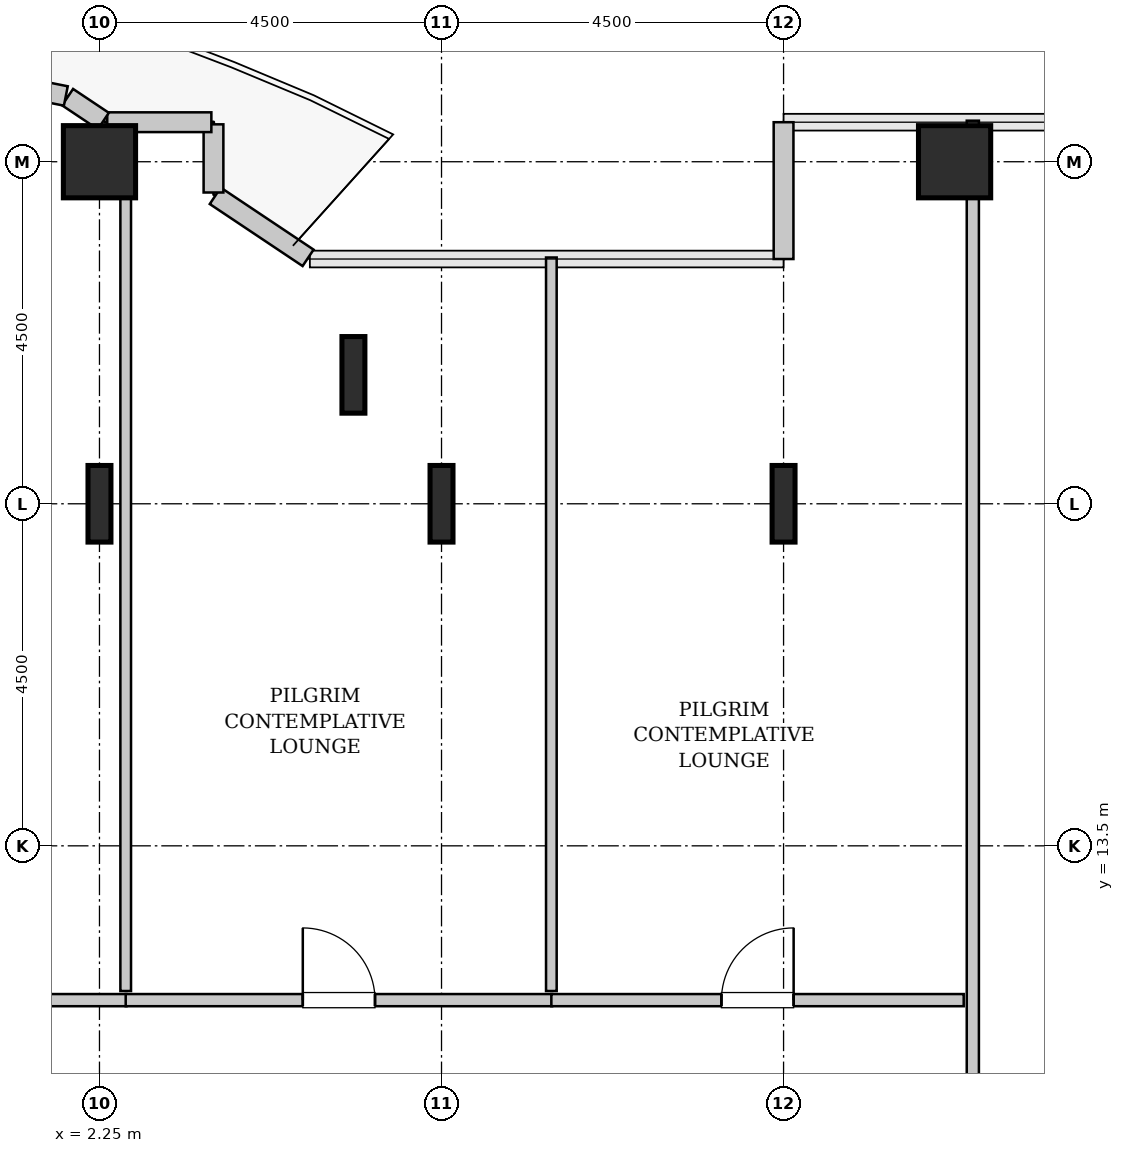
"""IFC4 building model, lengths in metres.
Left out: names, types, materials, properties, quantities, classifications, styles, units other than length and angle.
Written with IfcOpenShell. Run it as: python <this file> out.ifc"""

import sys

from ifc_helpers import new_model, si_unit, direction, frame, frame_2d, origin, origin_2d, place, context, subcontext, project, spatial, rectangle, hollow_rectangle, i_section, extrude, source, transform, mapped, element, fill, save


model = new_model("IFC4")
c1 = context("Model", 3, precision=1e-05, world=origin(), true_north=direction((0.0, 1.0)))
c2 = subcontext(c1, "Body", "Model", "MODEL_VIEW")
j1 = project(units=[si_unit("LENGTHUNIT", "METRE"), si_unit("PLANEANGLEUNIT", "RADIAN")], contexts=[c1])
p1 = place(None, origin())
s1 = spatial("IfcSite", under=j1, at=p1, CompositionType="ELEMENT")
p2 = place(p1, origin())
s2 = spatial("IfcBuilding", under=s1, at=p2, CompositionType="ELEMENT")
p3 = place(p2, frame((0.0, 0.0, 90.8)))
s3 = spatial("IfcBuildingStorey", under=s2, at=p3, CompositionType="ELEMENT", Elevation=90.8)
m1 = source(origin(), c2, "Body", "SweptSolid", [
    extrude(i_section(OverallWidth=0.302, OverallDepth=1.008, WebThickness=0.021, FlangeThickness=0.04, FilletRadius=0.03, at=origin_2d()), origin(), (0.0, 0.0, 1.0), 3.8),
])
p4 = place(p3, frame((2.25, 18.0, 0.0), z_axis=(0.0, 0.0, 1.0), x_axis=(1.0, 0.0, 0.0)))
e1 = element("IfcColumn", 1, at=p4, inside=s3, PredefinedType="COLUMN", context=c2, shape_type="MappedRepresentation", body=[
    mapped(m1, transform((0.0, 0.0, 0.0), x_axis=(1.0, 0.0, 0.0), y_axis=(0.0, 1.0, 0.0), z_axis=(0.0, 0.0, 1.0), scale=1.0)),
])
m2 = source(origin(), c2, "Body", "SweptSolid", [
    extrude(hollow_rectangle(XDim=0.95, YDim=0.95, WallThickness=0.045, InnerFilletRadius=0.045, OuterFilletRadius=0.09, at=origin_2d()), origin(), (0.0, 0.0, 1.0), 3.8),
])
p5 = place(p3, frame((2.25, 22.5, 0.0), z_axis=(0.0, 0.0, 1.0), x_axis=(1.0, 0.0, 0.0)))
e2 = element("IfcColumn", 2, at=p5, inside=s3, PredefinedType="COLUMN", context=c2, shape_type="MappedRepresentation", body=[
    mapped(m2, transform((0.0, 0.0, 0.0), x_axis=(1.0, 0.0, 0.0), y_axis=(0.0, 1.0, 0.0), z_axis=(0.0, 0.0, 1.0), scale=1.0)),
])
for number, where, z_axis, x_axis in (
    (3, (5.591, 19.696, 0.0), (0.0, 0.0, 1.0), (1.0, 0.0, 0.0)),
    (4, (6.75, 18.0, 0.0), (0.0, 0.0, 1.0), (1.0, 0.0, 0.0)),
    (5, (11.25, 18.0, 0.0), (0.0, 0.0, 1.0), (1.0, 0.0, 0.0)),
):
    element("IfcColumn", number, at=place(p3, frame(where, z_axis=z_axis, x_axis=x_axis)), inside=s3, PredefinedType="COLUMN", context=c2, shape_type="MappedRepresentation", body=[
        mapped(m1, transform((0.0, 0.0, 0.0), x_axis=(1.0, 0.0, 0.0), y_axis=(0.0, 1.0, 0.0), z_axis=(0.0, 0.0, 1.0), scale=1.0)),
    ])
p6 = place(p3, frame((13.5, 22.5, 0.0), z_axis=(0.0, 0.0, 1.0), x_axis=(1.0, 0.0, 0.0)))
e6 = element("IfcColumn", 6, at=p6, inside=s3, PredefinedType="COLUMN", context=c2, shape_type="MappedRepresentation", body=[
    mapped(m2, transform((0.0, 0.0, 0.0), x_axis=(1.0, 0.0, 0.0), y_axis=(0.0, 1.0, 0.0), z_axis=(0.0, 0.0, 1.0), scale=1.0)),
])
m3 = source(origin(), c2, "Body", "SweptSolid", [
    extrude(rectangle(XDim=1.8, YDim=0.26, at=frame_2d((0.9, 0.0))), origin(), (0.0, 0.0, 1.0), 3.55),
])
p7 = place(p3, frame((11.25, 23.02, 0.0), z_axis=(0.0, 0.0, 1.0), x_axis=(0.0, -1.0, 0.0)))
e7 = element("IfcWall", 7, at=p7, inside=s3, PredefinedType="SOLIDWALL", context=c2, shape_type="MappedRepresentation", body=[
    mapped(m3, transform((0.0, 0.0, 0.0), x_axis=(1.0, 0.0, 0.0), y_axis=(0.0, 1.0, 0.0), z_axis=(0.0, 0.0, 1.0), scale=1.0)),
])
m4 = source(origin(), c2, "Body", "SweptSolid", [
    extrude(rectangle(XDim=1.469, YDim=0.26, at=frame_2d((0.734, 0.0))), origin(), (0.0, 0.0, 1.0), 3.55),
])
p8 = place(p3, frame((4.995, 21.236, 0.0), z_axis=(0.0, 0.0, 1.0), x_axis=(-0.831461760506, 0.555581983884, 0.0)))
e8 = element("IfcWall", 8, at=p8, inside=s3, PredefinedType="SOLIDWALL", context=c2, shape_type="MappedRepresentation", body=[
    mapped(m4, transform((0.0, 0.0, 0.0), x_axis=(1.0, 0.0, 0.0), y_axis=(0.0, 1.0, 0.0), z_axis=(0.0, 0.0, 1.0), scale=1.0)),
])
m5 = source(origin(), c2, "Body", "SweptSolid", [
    extrude(rectangle(XDim=0.897, YDim=0.26, at=frame_2d((0.448, 0.0))), origin(), (0.0, 0.0, 1.0), 3.55),
])
p9 = place(p3, frame((3.75, 22.095, 0.0), z_axis=(0.0, 0.0, 1.0), x_axis=(0.0, 1.0, 0.0)))
e9 = element("IfcWall", 9, at=p9, inside=s3, PredefinedType="SOLIDWALL", context=c2, shape_type="MappedRepresentation", body=[
    mapped(m5, transform((0.0, 0.0, 0.0), x_axis=(1.0, 0.0, 0.0), y_axis=(0.0, 1.0, 0.0), z_axis=(0.0, 0.0, 1.0), scale=1.0)),
])
m6 = source(origin(), c2, "Body", "SweptSolid", [
    extrude(rectangle(XDim=1.37, YDim=0.26, at=frame_2d((0.685, 0.0))), origin(), (0.0, 0.0, 1.0), 3.55),
])
p10 = place(p3, frame((3.722, 23.02, 0.0), z_axis=(0.0, 0.0, 1.0), x_axis=(-1.0, 0.0, 0.0)))
e10 = element("IfcWall", 10, at=p10, inside=s3, PredefinedType="SOLIDWALL", context=c2, shape_type="MappedRepresentation", body=[
    mapped(m6, transform((0.0, 0.0, 0.0), x_axis=(1.0, 0.0, 0.0), y_axis=(0.0, 1.0, 0.0), z_axis=(0.0, 0.0, 1.0), scale=1.0)),
])
m7 = source(origin(), c2, "Body", "SweptSolid", [
    extrude(rectangle(XDim=0.565, YDim=0.26, at=frame_2d((0.283, 0.0))), origin(), (0.0, 0.0, 1.0), 3.55),
])
p11 = place(p3, frame((2.301, 23.036, 0.0), z_axis=(0.0, 0.0, 1.0), x_axis=(-0.831651492666, 0.555297933317, 0.0)))
e11 = element("IfcWall", 11, at=p11, inside=s3, PredefinedType="SOLIDWALL", context=c2, shape_type="MappedRepresentation", body=[
    mapped(m7, transform((0.0, 0.0, 0.0), x_axis=(1.0, 0.0, 0.0), y_axis=(0.0, 1.0, 0.0), z_axis=(0.0, 0.0, 1.0), scale=1.0)),
])
m8 = source(origin(), c2, "Body", "SweptSolid", [
    extrude(rectangle(XDim=4.137, YDim=0.26, at=frame_2d((2.068, 0.0))), origin(), (0.0, 0.0, 1.0), 3.55),
])
p12 = place(p3, frame((1.807, 23.365, 0.0), z_axis=(0.0, 0.0, 1.0), x_axis=(-0.980782170794, 0.195105954428, 0.0)))
e12 = element("IfcWall", 12, at=p12, inside=s3, PredefinedType="SOLIDWALL", context=c2, shape_type="MappedRepresentation", body=[
    mapped(m8, transform((0.0, 0.0, 0.0), x_axis=(1.0, 0.0, 0.0), y_axis=(0.0, 1.0, 0.0), z_axis=(0.0, 0.0, 1.0), scale=1.0)),
])
p13 = place(p12, frame((0.488, 0.0, 0.0)))
e13 = element("IfcOpeningElement", 13, at=p13, cuts=e12, PredefinedType="OPENING", context=c2, shape_type="SweptSolid", body=[
    extrude(rectangle(XDim=1.1, YDim=2.2, at=frame_2d((0.55, 1.1))), frame((0.0, 0.14, 0.0), z_axis=(0.0, -1.0, 0.0), x_axis=(1.0, 0.0, 0.0)), (0.0, 0.0, 1.0), 0.28),
])
m9 = source(origin(), c2, "Body", "SweptSolid", [
    extrude(rectangle(XDim=16.135, YDim=0.16, at=frame_2d((8.067, 0.0))), origin(), (0.0, 0.0, 1.0), 3.535),
])
p14 = place(p3, frame((13.74, 6.905, 0.0), z_axis=(0.0, 0.0, 1.0), x_axis=(0.0, 1.0, 0.0)))
e14 = element("IfcWall", 14, at=p14, inside=s3, PredefinedType="PARTITIONING", context=c2, shape_type="MappedRepresentation", body=[
    mapped(m9, transform((0.0, 0.0, 0.0), x_axis=(1.0, 0.0, 0.0), y_axis=(0.0, 1.0, 0.0), z_axis=(0.0, 0.0, 1.0), scale=1.0)),
])
p15 = place(p14, frame((1.827, 0.0, 0.0)))
e15 = element("IfcOpeningElement", 15, at=p15, cuts=e14, PredefinedType="OPENING", context=c2, shape_type="SweptSolid", body=[
    extrude(rectangle(XDim=0.95, YDim=2.1, at=frame_2d((0.475, 1.05))), frame((0.0, 0.09, 0.0), z_axis=(0.0, -1.0, 0.0), x_axis=(1.0, 0.0, 0.0)), (0.0, 0.0, 1.0), 0.18),
])
m10 = source(origin(), c2, "Body", "SweptSolid", [
    extrude(rectangle(XDim=5.005, YDim=0.16, at=frame_2d((2.502, 0.0))), origin(), (0.0, 0.0, 1.0), 3.535),
])
p16 = place(p3, frame((-2.4, 11.47, 0.0), z_axis=(0.0, 0.0, 1.0), x_axis=(1.0, 0.0, 0.0)))
e16 = element("IfcWall", 16, at=p16, inside=s3, PredefinedType="PARTITIONING", context=c2, shape_type="MappedRepresentation", body=[
    mapped(m10, transform((0.0, 0.0, 0.0), x_axis=(1.0, 0.0, 0.0), y_axis=(0.0, 1.0, 0.0), z_axis=(0.0, 0.0, 1.0), scale=1.0)),
])
p17 = place(p16, frame((2.028, 0.0, 0.0)))
e17 = element("IfcOpeningElement", 17, at=p17, cuts=e16, PredefinedType="OPENING", context=c2, shape_type="SweptSolid", body=[
    extrude(rectangle(XDim=0.95, YDim=2.1, at=frame_2d((0.475, 1.05))), frame((0.0, 0.09, 0.0), z_axis=(0.0, -1.0, 0.0), x_axis=(1.0, 0.0, 0.0)), (0.0, 0.0, 1.0), 0.18),
])
m11 = source(origin(), c2, "Body", "SweptSolid", [
    extrude(rectangle(XDim=11.26, YDim=0.14, at=frame_2d((5.63, 0.0))), origin(), (0.0, 0.0, 1.0), 2.825),
])
p18 = place(p3, frame((2.595, 11.59, 0.0), z_axis=(0.0, 0.0, 1.0), x_axis=(0.0, 1.0, 0.0)))
e18 = element("IfcWall", 18, at=p18, inside=s3, PredefinedType="PARTITIONING", context=c2, shape_type="MappedRepresentation", body=[
    mapped(m11, transform((0.0, 0.0, 0.0), x_axis=(1.0, 0.0, 0.0), y_axis=(0.0, 1.0, 0.0), z_axis=(0.0, 0.0, 1.0), scale=1.0)),
])
m12 = source(origin(), c2, "Body", "SweptSolid", [
    extrude(rectangle(XDim=5.61, YDim=0.16, at=frame_2d((2.805, 0.0))), origin(), (0.0, 0.0, 1.0), 3.535),
])
p19 = place(p3, frame((2.595, 11.47, 0.0), z_axis=(0.0, 0.0, 1.0), x_axis=(1.0, 0.0, 0.0)))
e19 = element("IfcWall", 19, at=p19, inside=s3, PredefinedType="PARTITIONING", context=c2, shape_type="MappedRepresentation", body=[
    mapped(m12, transform((0.0, 0.0, 0.0), x_axis=(1.0, 0.0, 0.0), y_axis=(0.0, 1.0, 0.0), z_axis=(0.0, 0.0, 1.0), scale=1.0)),
])
p20 = place(p19, frame((2.33, 0.0, 0.0)))
e20 = element("IfcOpeningElement", 20, at=p20, cuts=e19, PredefinedType="OPENING", context=c2, shape_type="SweptSolid", body=[
    extrude(rectangle(XDim=0.95, YDim=2.1, at=frame_2d((0.475, 1.05))), frame((0.0, 0.09, 0.0), z_axis=(0.0, -1.0, 0.0), x_axis=(1.0, 0.0, 0.0)), (0.0, 0.0, 1.0), 0.18),
])
m13 = source(origin(), c2, "Body", "SweptSolid", [
    extrude(rectangle(XDim=9.65, YDim=0.14, at=frame_2d((4.825, 0.0))), origin(), (0.0, 0.0, 1.0), 3.535),
])
p21 = place(p3, frame((8.195, 11.59, 0.0), z_axis=(0.0, 0.0, 1.0), x_axis=(0.0, 1.0, 0.0)))
e21 = element("IfcWall", 21, at=p21, inside=s3, PredefinedType="PARTITIONING", context=c2, shape_type="MappedRepresentation", body=[
    mapped(m13, transform((0.0, 0.0, 0.0), x_axis=(1.0, 0.0, 0.0), y_axis=(0.0, 1.0, 0.0), z_axis=(0.0, 0.0, 1.0), scale=1.0)),
])
m14 = source(origin(), c2, "Body", "SweptSolid", [
    extrude(rectangle(XDim=5.425, YDim=0.16, at=frame_2d((2.712, 0.0))), origin(), (0.0, 0.0, 1.0), 3.535),
])
p22 = place(p3, frame((8.195, 11.47, 0.0), z_axis=(0.0, 0.0, 1.0), x_axis=(1.0, 0.0, 0.0)))
e22 = element("IfcWall", 22, at=p22, inside=s3, PredefinedType="PARTITIONING", context=c2, shape_type="MappedRepresentation", body=[
    mapped(m14, transform((0.0, 0.0, 0.0), x_axis=(1.0, 0.0, 0.0), y_axis=(0.0, 1.0, 0.0), z_axis=(0.0, 0.0, 1.0), scale=1.0)),
])
p23 = place(p22, frame((2.238, 0.0, 0.0)))
e23 = element("IfcOpeningElement", 23, at=p23, cuts=e22, PredefinedType="OPENING", context=c2, shape_type="SweptSolid", body=[
    extrude(rectangle(XDim=0.95, YDim=2.1, at=frame_2d((0.475, 1.05))), frame((0.0, 0.09, 0.0), z_axis=(0.0, -1.0, 0.0), x_axis=(1.0, 0.0, 0.0)), (0.0, 0.0, 1.0), 0.18),
])
m15 = source(origin(), c2, "Body", "SweptSolid", [
    extrude(rectangle(XDim=0.95, YDim=2.1, at=frame_2d((0.475, 1.05))), frame((0.0, 0.025, 0.0), z_axis=(0.0, -1.0, 0.0), x_axis=(1.0, 0.0, 0.0)), (0.0, 0.0, 1.0), 0.05),
])
p24 = place(p20, origin())
e24 = element("IfcDoor", 24, at=p24, inside=s3, OperationType="SINGLE_SWING_LEFT", PredefinedType="DOOR", context=c2, shape_type="MappedRepresentation", body=[
    mapped(m15, transform((0.0, 0.0, 0.0), x_axis=(1.0, 0.0, 0.0), y_axis=(0.0, 1.0, 0.0), z_axis=(0.0, 0.0, 1.0), scale=1.0)),
])
fill(e20, e24)
p25 = place(p23, origin())
e25 = element("IfcDoor", 25, at=p25, inside=s3, OperationType="SINGLE_SWING_RIGHT", PredefinedType="DOOR", context=c2, shape_type="MappedRepresentation", body=[
    mapped(m15, transform((0.0, 0.0, 0.0), x_axis=(1.0, 0.0, 0.0), y_axis=(0.0, 1.0, 0.0), z_axis=(0.0, 0.0, 1.0), scale=1.0)),
])
fill(e23, e25)
save(model, sys.argv[1])
